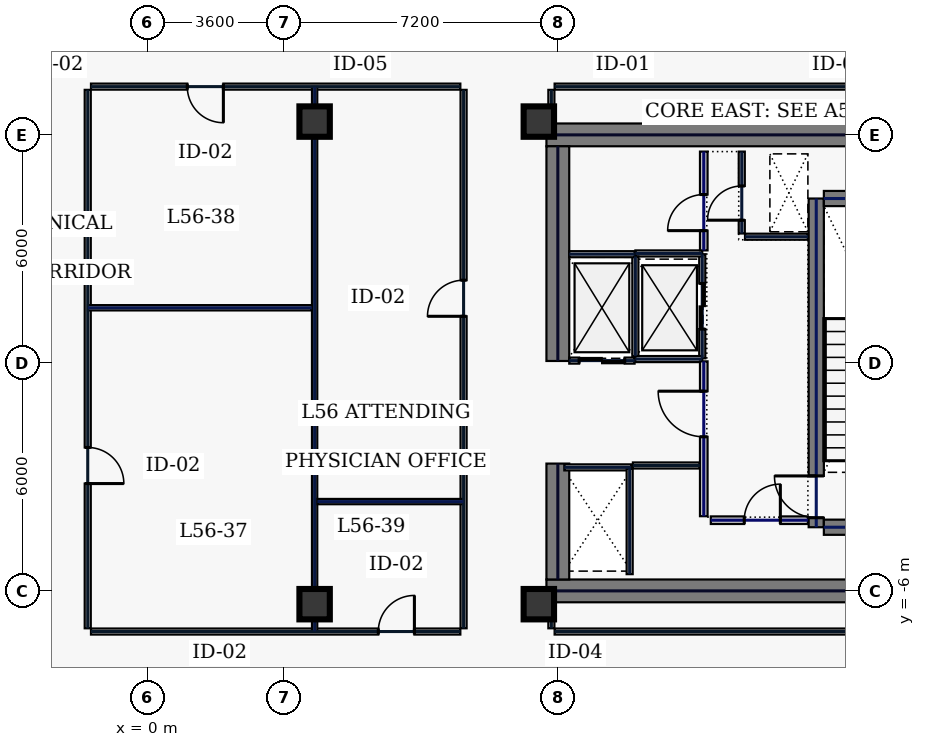
"""IFC4 building model, lengths in metres.
Left out: names, types, materials, properties, quantities, classifications, styles, units other than length and angle.
Written with IfcOpenShell. Run it as: python <this file> out.ifc"""

import sys

from ifc_helpers import new_model, si_unit, direction, frame, frame_2d, origin, origin_2d, place, context, subcontext, project, spatial, rectangle, hollow_rectangle, extrude, element, fill, save


model = new_model("IFC4")
c1 = context("Model", 3, precision=1e-05, world=origin(), true_north=direction((0.0, 1.0)))
c2 = subcontext(c1, "Body", "Model", "MODEL_VIEW")
j1 = project(units=[si_unit("LENGTHUNIT", "METRE"), si_unit("PLANEANGLEUNIT", "RADIAN")], contexts=[c1])
p1 = place(None, origin())
s1 = spatial("IfcSite", under=j1, at=p1, CompositionType="ELEMENT")
p2 = place(p1, origin())
s2 = spatial("IfcBuilding", under=s1, at=p2, CompositionType="ELEMENT")
p3 = place(p2, frame((0.0, 0.0, 243.0)))
s3 = spatial("IfcBuildingStorey", under=s2, at=p3, CompositionType="ELEMENT", Elevation=243.0)
for number, where, z_axis, x_axis in (
    (1, (10.5, 6.0, 0.0), (0.0, 0.0, 1.0), (1.0, 0.0, 0.0)),
    (2, (10.5, -6.0, 0.0), (0.0, 0.0, 1.0), (1.0, 0.0, 0.0)),
):
    element("IfcWall", number, at=place(p3, frame(where, z_axis=z_axis, x_axis=x_axis)), inside=s3, PredefinedType="SHEAR", context=c2, shape_type="SweptSolid", body=[
        extrude(rectangle(XDim=11.5, YDim=0.6, at=frame_2d((5.75, 0.0))), origin(), (0.0, 0.0, 1.0), 3.74),
    ])
p4 = place(p3, frame((10.8, -5.7, 0.0), z_axis=(0.0, 0.0, 1.0), x_axis=(0.0, 1.0, 0.0)))
e3 = element("IfcWall", 3, at=p4, inside=s3, PredefinedType="SHEAR", context=c2, shape_type="SweptSolid", body=[
    extrude(rectangle(XDim=3.05, YDim=0.6, at=frame_2d((1.525, 0.0))), origin(), (0.0, 0.0, 1.0), 3.74),
])
p5 = place(p3, frame((10.8, 0.05, 0.0), z_axis=(0.0, 0.0, 1.0), x_axis=(0.0, 1.0, 0.0)))
e4 = element("IfcWall", 4, at=p5, inside=s3, PredefinedType="SHEAR", context=c2, shape_type="SweptSolid", body=[
    extrude(rectangle(XDim=5.65, YDim=0.6, at=frame_2d((2.825, 0.0))), origin(), (0.0, 0.0, 1.0), 3.74),
])
p6 = place(p3, frame((17.6, -4.325, 0.0), z_axis=(0.0, 0.0, 1.0), x_axis=(0.0, 1.0, 0.0)))
e5 = element("IfcWall", 5, at=p6, inside=s3, PredefinedType="SHEAR", context=c2, shape_type="SweptSolid", body=[
    extrude(rectangle(XDim=8.65, YDim=0.4, at=frame_2d((4.325, 0.0))), origin(), (0.0, 0.0, 1.0), 3.74),
])
p7 = place(p6, frame((0.25, 0.0, 0.0)))
e6 = element("IfcOpeningElement", 6, at=p7, cuts=e5, PredefinedType="OPENING", context=c2, shape_type="SweptSolid", body=[
    extrude(rectangle(XDim=1.1, YDim=2.2, at=frame_2d((0.55, 1.1))), frame((0.0, 0.21, 0.0), z_axis=(0.0, -1.0, 0.0), x_axis=(1.0, 0.0, 0.0)), (0.0, 0.0, 1.0), 0.42),
])
for number, where, z_axis, x_axis in (
    (7, (17.8, -4.325, 0.0), (0.0, 0.0, 1.0), (1.0, 0.0, 0.0)),
    (8, (17.8, 4.325, 0.0), (0.0, 0.0, 1.0), (1.0, 0.0, 0.0)),
):
    element("IfcWall", number, at=place(p3, frame(where, z_axis=z_axis, x_axis=x_axis)), inside=s3, PredefinedType="SHEAR", context=c2, shape_type="SweptSolid", body=[
        extrude(rectangle(XDim=3.4, YDim=0.4, at=frame_2d((1.7, 0.0))), origin(), (0.0, 0.0, 1.0), 3.74),
    ])
for number, where, z_axis, x_axis in (
    (9, (10.3, -6.35, 0.0), (0.0, 0.0, 1.0), (1.0, 0.0, 0.0)),
    (10, (10.3, 6.35, 0.0), (0.0, 0.0, 1.0), (1.0, 0.0, 0.0)),
    (11, (4.4, -6.35, 0.0), (0.0, 0.0, 1.0), (1.0, 0.0, 0.0)),
    (12, (4.4, 6.35, 0.0), (0.0, 0.0, 1.0), (1.0, 0.0, 0.0)),
):
    element("IfcColumn", number, at=place(p3, frame(where, z_axis=z_axis, x_axis=x_axis)), inside=s3, PredefinedType="COLUMN", context=c2, shape_type="SweptSolid", body=[
        extrude(hollow_rectangle(XDim=0.8, YDim=0.8, WallThickness=0.036, at=origin_2d()), origin(), (0.0, 0.0, 1.0), 3.74),
    ])
p8 = place(p3, frame((14.6, 0.12, 0.0), z_axis=(0.0, 0.0, 1.0), x_axis=(0.0, 1.0, 0.0)))
e13 = element("IfcWall", 13, at=p8, inside=s3, PredefinedType="PARTITIONING", context=c2, shape_type="SweptSolid", body=[
    extrude(rectangle(XDim=2.74, YDim=0.16, at=frame_2d((1.37, 0.0))), origin(), (0.0, 0.0, 1.0), 3.74),
])
p9 = place(p8, frame((0.77, 0.0, 0.0)))
e14 = element("IfcOpeningElement", 14, at=p9, cuts=e13, PredefinedType="OPENING", context=c2, shape_type="SweptSolid", body=[
    extrude(rectangle(XDim=1.2, YDim=2.2, at=frame_2d((0.6, 1.1))), frame((0.0, 0.09, 0.0), z_axis=(0.0, -1.0, 0.0), x_axis=(1.0, 0.0, 0.0)), (0.0, 0.0, 1.0), 0.18),
])
for number, where, z_axis, x_axis in (
    (15, (12.84, 0.1, 0.0), (0.0, 0.0, 1.0), (1.0, 0.0, 0.0)),
    (16, (12.84, 2.88, 0.0), (0.0, 0.0, 1.0), (1.0, 0.0, 0.0)),
):
    element("IfcWall", number, at=place(p3, frame(where, z_axis=z_axis, x_axis=x_axis)), inside=s3, PredefinedType="PARTITIONING", context=c2, shape_type="SweptSolid", body=[
        extrude(rectangle(XDim=1.76, YDim=0.16, at=frame_2d((0.88, 0.0))), origin(), (0.0, 0.0, 1.0), 3.74),
    ])
p10 = place(p3, frame((12.84, 0.18, 0.0), z_axis=(0.0, 0.0, 1.0), x_axis=(0.0, 1.0, 0.0)))
e17 = element("IfcWall", 17, at=p10, inside=s3, PredefinedType="PARTITIONING", context=c2, shape_type="SweptSolid", body=[
    extrude(rectangle(XDim=2.62, YDim=0.16, at=frame_2d((1.31, 0.0))), origin(), (0.0, 0.0, 1.0), 3.74),
])
p11 = place(p3, frame((10.97, -2.75, 0.0), z_axis=(0.0, 0.0, 1.0), x_axis=(1.0, 0.0, 0.0)))
e18 = element("IfcWall", 18, at=p11, inside=s3, PredefinedType="PARTITIONING", context=c2, shape_type="SweptSolid", body=[
    extrude(rectangle(XDim=1.76, YDim=0.16, at=frame_2d((0.88, 0.0))), origin(), (0.0, 0.0, 1.0), 3.74),
])
p12 = place(p3, frame((11.1, 0.06, 0.0), z_axis=(0.0, 0.0, 1.0), x_axis=(1.0, 0.0, 0.0)))
e19 = element("IfcWall", 19, at=p12, inside=s3, PredefinedType="PARTITIONING", context=c2, shape_type="SweptSolid", body=[
    extrude(rectangle(XDim=1.72, YDim=0.16, at=frame_2d((0.86, 0.0))), origin(), (0.0, 0.0, 1.0), 3.74),
])
p13 = place(p12, frame((0.26, 0.0, 0.0)))
e20 = element("IfcOpeningElement", 20, at=p13, cuts=e19, PredefinedType="OPENING", context=c2, shape_type="SweptSolid", body=[
    extrude(rectangle(XDim=1.2, YDim=2.2, at=frame_2d((0.6, 1.1))), frame((0.0, 0.09, 0.0), z_axis=(0.0, -1.0, 0.0), x_axis=(1.0, 0.0, 0.0)), (0.0, 0.0, 1.0), 0.18),
])
p14 = place(p3, frame((11.1, 2.86, 0.0), z_axis=(0.0, 0.0, 1.0), x_axis=(1.0, 0.0, 0.0)))
e21 = element("IfcWall", 21, at=p14, inside=s3, PredefinedType="PARTITIONING", context=c2, shape_type="SweptSolid", body=[
    extrude(rectangle(XDim=1.72, YDim=0.16, at=frame_2d((0.86, 0.0))), origin(), (0.0, 0.0, 1.0), 3.74),
])
p15 = place(p3, frame((15.64, 3.405, 0.0), z_axis=(0.0, 0.0, 1.0), x_axis=(0.0, 1.0, 0.0)))
e22 = element("IfcWall", 22, at=p15, inside=s3, PredefinedType="PARTITIONING", context=c2, shape_type="SweptSolid", body=[
    extrude(rectangle(XDim=2.155, YDim=0.16, at=frame_2d((1.078, 0.0))), origin(), (0.0, 0.0, 1.0), 3.74),
])
p16 = place(p15, frame((0.35, 0.0, 0.0)))
e23 = element("IfcOpeningElement", 23, at=p16, cuts=e22, PredefinedType="OPENING", context=c2, shape_type="SweptSolid", body=[
    extrude(rectangle(XDim=0.9, YDim=2.2, at=frame_2d((0.45, 1.1))), frame((0.0, 0.09, 0.0), z_axis=(0.0, -1.0, 0.0), x_axis=(1.0, 0.0, 0.0)), (0.0, 0.0, 1.0), 0.18),
])
p17 = place(p3, frame((15.725, 3.32, 0.0), z_axis=(0.0, 0.0, 1.0), x_axis=(1.0, 0.0, 0.0)))
e24 = element("IfcWall", 24, at=p17, inside=s3, PredefinedType="PARTITIONING", context=c2, shape_type="SweptSolid", body=[
    extrude(rectangle(XDim=1.655, YDim=0.16, at=frame_2d((0.827, 0.0))), origin(), (0.0, 0.0, 1.0), 3.74),
])
p18 = place(p3, frame((14.825, -4.14, 0.0), z_axis=(0.0, 0.0, 1.0), x_axis=(1.0, 0.0, 0.0)))
e25 = element("IfcWall", 25, at=p18, inside=s3, PredefinedType="SOLIDWALL", context=c2, shape_type="SweptSolid", body=[
    extrude(rectangle(XDim=2.555, YDim=0.2, at=frame_2d((1.277, 0.0))), origin(), (0.0, 0.0, 1.0), 3.74),
])
p19 = place(p18, frame((0.88, 0.0, 0.0)))
e26 = element("IfcOpeningElement", 26, at=p19, cuts=e25, PredefinedType="OPENING", context=c2, shape_type="SweptSolid", body=[
    extrude(rectangle(XDim=0.95, YDim=2.2, at=frame_2d((0.475, 1.1))), frame((0.0, 0.11, 0.0), z_axis=(0.0, -1.0, 0.0), x_axis=(1.0, 0.0, 0.0)), (0.0, 0.0, 1.0), 0.22),
])
p20 = place(p3, frame((12.775, -2.7, 0.0), z_axis=(0.0, 0.0, 1.0), x_axis=(1.0, 0.0, 0.0)))
e27 = element("IfcWall", 27, at=p20, inside=s3, PredefinedType="PARTITIONING", context=c2, shape_type="SweptSolid", body=[
    extrude(rectangle(XDim=1.76, YDim=0.16, at=frame_2d((0.88, 0.0))), origin(), (0.0, 0.0, 1.0), 3.74),
])
p21 = place(p3, frame((12.69, -5.56, 0.0), z_axis=(0.0, 0.0, 1.0), x_axis=(0.0, 1.0, 0.0)))
e28 = element("IfcWall", 28, at=p21, inside=s3, PredefinedType="PARTITIONING", context=c2, shape_type="SweptSolid", body=[
    extrude(rectangle(XDim=2.775, YDim=0.16, at=frame_2d((1.388, 0.0))), origin(), (0.0, 0.0, 1.0), 3.74),
])
p22 = place(p3, frame((14.64, 2.96, 0.0), z_axis=(0.0, 0.0, 1.0), x_axis=(0.0, 1.0, 0.0)))
e29 = element("IfcWall", 29, at=p22, inside=s3, PredefinedType="SOLIDWALL", context=c2, shape_type="SweptSolid", body=[
    extrude(rectangle(XDim=2.6, YDim=0.2, at=frame_2d((1.3, 0.0))), origin(), (0.0, 0.0, 1.0), 3.74),
])
p23 = place(p22, frame((0.52, 0.0, 0.0)))
e30 = element("IfcOpeningElement", 30, at=p23, cuts=e29, PredefinedType="OPENING", context=c2, shape_type="SweptSolid", body=[
    extrude(rectangle(XDim=0.95, YDim=2.2, at=frame_2d((0.475, 1.1))), frame((0.0, 0.11, 0.0), z_axis=(0.0, -1.0, 0.0), x_axis=(1.0, 0.0, 0.0)), (0.0, 0.0, 1.0), 0.22),
])
p24 = place(p3, frame((14.64, -4.035, 0.0), z_axis=(0.0, 0.0, 1.0), x_axis=(0.0, 1.0, 0.0)))
e31 = element("IfcWall", 31, at=p24, inside=s3, PredefinedType="SOLIDWALL", context=c2, shape_type="SweptSolid", body=[
    extrude(rectangle(XDim=4.075, YDim=0.2, at=frame_2d((2.038, 0.0))), origin(), (0.0, 0.0, 1.0), 3.74),
])
p25 = place(p24, frame((2.09, 0.0, 0.0)))
e32 = element("IfcOpeningElement", 32, at=p25, cuts=e31, PredefinedType="OPENING", context=c2, shape_type="SweptSolid", body=[
    extrude(rectangle(XDim=1.2, YDim=2.2, at=frame_2d((0.6, 1.1))), frame((0.0, 0.11, 0.0), z_axis=(0.0, -1.0, 0.0), x_axis=(1.0, 0.0, 0.0)), (0.0, 0.0, 1.0), 0.22),
])
p26 = place(p3, frame((22.585, 7.27, 0.0), z_axis=(0.0, 0.0, 1.0), x_axis=(-1.0, 0.0, 0.0)))
e33 = element("IfcWall", 33, at=p26, inside=s3, PredefinedType="PARTITIONING", context=c2, shape_type="SweptSolid", body=[
    extrude(rectangle(XDim=11.87, YDim=0.16, at=frame_2d((5.935, 0.0))), origin(), (0.0, 0.0, 1.0), 3.74),
])
p27 = place(p3, frame((10.63, 7.185, 0.0), z_axis=(0.0, 0.0, 1.0), x_axis=(0.0, -1.0, 0.0)))
e34 = element("IfcWall", 34, at=p27, inside=s3, PredefinedType="PARTITIONING", context=c2, shape_type="SweptSolid", body=[
    extrude(rectangle(XDim=0.765, YDim=0.16, at=frame_2d((0.383, 0.0))), origin(), (0.0, 0.0, 1.0), 3.74),
])
p28 = place(p3, frame((10.63, -6.42, 0.0), z_axis=(0.0, 0.0, 1.0), x_axis=(0.0, -1.0, 0.0)))
e35 = element("IfcWall", 35, at=p28, inside=s3, PredefinedType="PARTITIONING", context=c2, shape_type="SweptSolid", body=[
    extrude(rectangle(XDim=0.565, YDim=0.16, at=frame_2d((0.283, 0.0))), origin(), (0.0, 0.0, 1.0), 3.74),
])
p29 = place(p3, frame((10.715, -7.07, 0.0), z_axis=(0.0, 0.0, 1.0), x_axis=(1.0, 0.0, 0.0)))
e36 = element("IfcWall", 36, at=p29, inside=s3, PredefinedType="PARTITIONING", context=c2, shape_type="SweptSolid", body=[
    extrude(rectangle(XDim=11.87, YDim=0.16, at=frame_2d((5.935, 0.0))), origin(), (0.0, 0.0, 1.0), 3.74),
])
p30 = place(p3, frame((8.235, 7.27, 0.0), z_axis=(0.0, 0.0, 1.0), x_axis=(-1.0, 0.0, 0.0)))
e37 = element("IfcWall", 37, at=p30, inside=s3, PredefinedType="PARTITIONING", context=c2, shape_type="SweptSolid", body=[
    extrude(rectangle(XDim=9.72, YDim=0.16, at=frame_2d((4.86, 0.0))), origin(), (0.0, 0.0, 1.0), 3.74),
])
p31 = place(p30, frame((6.236, 0.0, 0.0)))
e38 = element("IfcOpeningElement", 38, at=p31, cuts=e37, PredefinedType="OPENING", context=c2, shape_type="SweptSolid", body=[
    extrude(rectangle(XDim=0.95, YDim=2.2, at=frame_2d((0.475, 1.1))), frame((0.0, 0.09, 0.0), z_axis=(0.0, -1.0, 0.0), x_axis=(1.0, 0.0, 0.0)), (0.0, 0.0, 1.0), 0.18),
])
p32 = place(p3, frame((-1.57, 7.185, 0.0), z_axis=(0.0, 0.0, 1.0), x_axis=(0.0, -1.0, 0.0)))
e39 = element("IfcWall", 39, at=p32, inside=s3, PredefinedType="PARTITIONING", context=c2, shape_type="SweptSolid", body=[
    extrude(rectangle(XDim=14.17, YDim=0.16, at=frame_2d((7.085, 0.0))), origin(), (0.0, 0.0, 1.0), 3.74),
])
p33 = place(p32, frame((9.411, 0.0, 0.0)))
e40 = element("IfcOpeningElement", 40, at=p33, cuts=e39, PredefinedType="OPENING", context=c2, shape_type="SweptSolid", body=[
    extrude(rectangle(XDim=0.95, YDim=2.2, at=frame_2d((0.475, 1.1))), frame((0.0, 0.09, 0.0), z_axis=(0.0, -1.0, 0.0), x_axis=(1.0, 0.0, 0.0)), (0.0, 0.0, 1.0), 0.18),
])
p34 = place(p3, frame((-1.485, -7.07, 0.0), z_axis=(0.0, 0.0, 1.0), x_axis=(1.0, 0.0, 0.0)))
e41 = element("IfcWall", 41, at=p34, inside=s3, PredefinedType="PARTITIONING", context=c2, shape_type="SweptSolid", body=[
    extrude(rectangle(XDim=9.72, YDim=0.16, at=frame_2d((4.86, 0.0))), origin(), (0.0, 0.0, 1.0), 3.74),
])
p35 = place(p34, frame((7.561, 0.0, 0.0)))
e42 = element("IfcOpeningElement", 42, at=p35, cuts=e41, PredefinedType="OPENING", context=c2, shape_type="SweptSolid", body=[
    extrude(rectangle(XDim=0.95, YDim=2.2, at=frame_2d((0.475, 1.1))), frame((0.0, 0.09, 0.0), z_axis=(0.0, -1.0, 0.0), x_axis=(1.0, 0.0, 0.0)), (0.0, 0.0, 1.0), 0.18),
])
p36 = place(p3, frame((8.32, -6.985, 0.0), z_axis=(0.0, 0.0, 1.0), x_axis=(0.0, 1.0, 0.0)))
e43 = element("IfcWall", 43, at=p36, inside=s3, PredefinedType="PARTITIONING", context=c2, shape_type="SweptSolid", body=[
    extrude(rectangle(XDim=14.17, YDim=0.16, at=frame_2d((7.085, 0.0))), origin(), (0.0, 0.0, 1.0), 3.74),
])
p37 = place(p36, frame((8.211, 0.0, 0.0)))
e44 = element("IfcOpeningElement", 44, at=p37, cuts=e43, PredefinedType="OPENING", context=c2, shape_type="SweptSolid", body=[
    extrude(rectangle(XDim=0.95, YDim=2.2, at=frame_2d((0.475, 1.1))), frame((0.0, 0.09, 0.0), z_axis=(0.0, -1.0, 0.0), x_axis=(1.0, 0.0, 0.0)), (0.0, 0.0, 1.0), 0.18),
])
p38 = place(p3, frame((4.4, -7.065, 0.0), z_axis=(0.0, 0.0, 1.0), x_axis=(0.0, 1.0, 0.0)))
e45 = element("IfcWall", 45, at=p38, inside=s3, PredefinedType="PARTITIONING", context=c2, shape_type="SweptSolid", body=[
    extrude(rectangle(XDim=14.33, YDim=0.14, at=frame_2d((7.165, 0.0))), origin(), (0.0, 0.0, 1.0), 1.535),
])
p39 = place(p3, frame((-1.565, 1.45, 0.0), z_axis=(0.0, 0.0, 1.0), x_axis=(1.0, 0.0, 0.0)))
e46 = element("IfcWall", 46, at=p39, inside=s3, PredefinedType="PARTITIONING", context=c2, shape_type="SweptSolid", body=[
    extrude(rectangle(XDim=5.89, YDim=0.14, at=frame_2d((2.945, 0.0))), origin(), (0.0, 0.0, 1.0), 3.74),
])
p40 = place(p3, frame((4.475, -3.65, 0.0), z_axis=(0.0, 0.0, 1.0), x_axis=(1.0, 0.0, 0.0)))
e47 = element("IfcWall", 47, at=p40, inside=s3, PredefinedType="PARTITIONING", context=c2, shape_type="SweptSolid", body=[
    extrude(rectangle(XDim=3.84, YDim=0.14, at=frame_2d((1.92, 0.0))), origin(), (0.0, 0.0, 1.0), 3.74),
])
p41 = place(p7, origin())
e48 = element("IfcDoor", 48, at=p41, inside=s3, OperationType="SINGLE_SWING_RIGHT", PredefinedType="DOOR", context=c2, shape_type="SweptSolid", body=[
    extrude(rectangle(XDim=1.1, YDim=2.2, at=frame_2d((0.55, 1.1))), frame((0.0, 0.025, 0.0), z_axis=(0.0, -1.0, 0.0), x_axis=(1.0, 0.0, 0.0)), (0.0, 0.0, 1.0), 0.05),
])
fill(e6, e48)
p42 = place(p9, origin())
e49 = element("IfcDoor", 49, at=p42, inside=s3, OperationType="SLIDING_TO_LEFT", PredefinedType="DOOR", context=c2, shape_type="SweptSolid", body=[
    extrude(rectangle(XDim=1.2, YDim=2.2, at=frame_2d((0.6, 1.1))), frame((0.0, 0.025, 0.0), z_axis=(0.0, -1.0, 0.0), x_axis=(1.0, 0.0, 0.0)), (0.0, 0.0, 1.0), 0.05),
])
fill(e14, e49)
p43 = place(p13, origin())
e50 = element("IfcDoor", 50, at=p43, inside=s3, OperationType="SLIDING_TO_LEFT", PredefinedType="DOOR", context=c2, shape_type="SweptSolid", body=[
    extrude(rectangle(XDim=1.2, YDim=2.2, at=frame_2d((0.6, 1.1))), frame((0.0, 0.025, 0.0), z_axis=(0.0, -1.0, 0.0), x_axis=(1.0, 0.0, 0.0)), (0.0, 0.0, 1.0), 0.05),
])
fill(e20, e50)
p44 = place(p16, origin())
e51 = element("IfcDoor", 51, at=p44, inside=s3, OperationType="SINGLE_SWING_LEFT", PredefinedType="DOOR", context=c2, shape_type="SweptSolid", body=[
    extrude(rectangle(XDim=0.9, YDim=2.2, at=frame_2d((0.45, 1.1))), frame((0.0, 0.025, 0.0), z_axis=(0.0, -1.0, 0.0), x_axis=(1.0, 0.0, 0.0)), (0.0, 0.0, 1.0), 0.05),
])
fill(e23, e51)
p45 = place(p19, origin())
e52 = element("IfcDoor", 52, at=p45, inside=s3, OperationType="SINGLE_SWING_RIGHT", PredefinedType="DOOR", context=c2, shape_type="SweptSolid", body=[
    extrude(rectangle(XDim=0.95, YDim=2.2, at=frame_2d((0.475, 1.1))), frame((0.0, 0.025, 0.0), z_axis=(0.0, -1.0, 0.0), x_axis=(1.0, 0.0, 0.0)), (0.0, 0.0, 1.0), 0.05),
])
fill(e26, e52)
p46 = place(p23, origin())
e53 = element("IfcDoor", 53, at=p46, inside=s3, OperationType="SINGLE_SWING_LEFT", PredefinedType="DOOR", context=c2, shape_type="SweptSolid", body=[
    extrude(rectangle(XDim=0.95, YDim=2.2, at=frame_2d((0.475, 1.1))), frame((0.0, 0.025, 0.0), z_axis=(0.0, -1.0, 0.0), x_axis=(1.0, 0.0, 0.0)), (0.0, 0.0, 1.0), 0.05),
])
fill(e30, e53)
p47 = place(p25, origin())
e54 = element("IfcDoor", 54, at=p47, inside=s3, OperationType="SINGLE_SWING_RIGHT", PredefinedType="DOOR", context=c2, shape_type="SweptSolid", body=[
    extrude(rectangle(XDim=1.2, YDim=2.2, at=frame_2d((0.6, 1.1))), frame((0.0, 0.025, 0.0), z_axis=(0.0, -1.0, 0.0), x_axis=(1.0, 0.0, 0.0)), (0.0, 0.0, 1.0), 0.05),
])
fill(e32, e54)
p48 = place(p33, origin())
e55 = element("IfcDoor", 55, at=p48, inside=s3, OperationType="SINGLE_SWING_RIGHT", PredefinedType="DOOR", context=c2, shape_type="SweptSolid", body=[
    extrude(rectangle(XDim=0.95, YDim=2.2, at=frame_2d((0.475, 1.1))), frame((0.0, 0.025, 0.0), z_axis=(0.0, -1.0, 0.0), x_axis=(1.0, 0.0, 0.0)), (0.0, 0.0, 1.0), 0.05),
])
fill(e40, e55)
p49 = place(p31, origin())
e56 = element("IfcDoor", 56, at=p49, inside=s3, OperationType="SINGLE_SWING_LEFT", PredefinedType="DOOR", context=c2, shape_type="SweptSolid", body=[
    extrude(rectangle(XDim=0.95, YDim=2.2, at=frame_2d((0.475, 1.1))), frame((0.0, 0.025, 0.0), z_axis=(0.0, -1.0, 0.0), x_axis=(1.0, 0.0, 0.0)), (0.0, 0.0, 1.0), 0.05),
])
fill(e38, e56)
p50 = place(p35, origin())
e57 = element("IfcDoor", 57, at=p50, inside=s3, OperationType="SINGLE_SWING_RIGHT", PredefinedType="DOOR", context=c2, shape_type="SweptSolid", body=[
    extrude(rectangle(XDim=0.95, YDim=2.2, at=frame_2d((0.475, 1.1))), frame((0.0, 0.025, 0.0), z_axis=(0.0, -1.0, 0.0), x_axis=(1.0, 0.0, 0.0)), (0.0, 0.0, 1.0), 0.05),
])
fill(e42, e57)
p51 = place(p37, origin())
e58 = element("IfcDoor", 58, at=p51, inside=s3, OperationType="SINGLE_SWING_LEFT", PredefinedType="DOOR", context=c2, shape_type="SweptSolid", body=[
    extrude(rectangle(XDim=0.95, YDim=2.2, at=frame_2d((0.475, 1.1))), frame((0.0, 0.025, 0.0), z_axis=(0.0, -1.0, 0.0), x_axis=(1.0, 0.0, 0.0)), (0.0, 0.0, 1.0), 0.05),
])
fill(e44, e58)
save(model, sys.argv[1])
